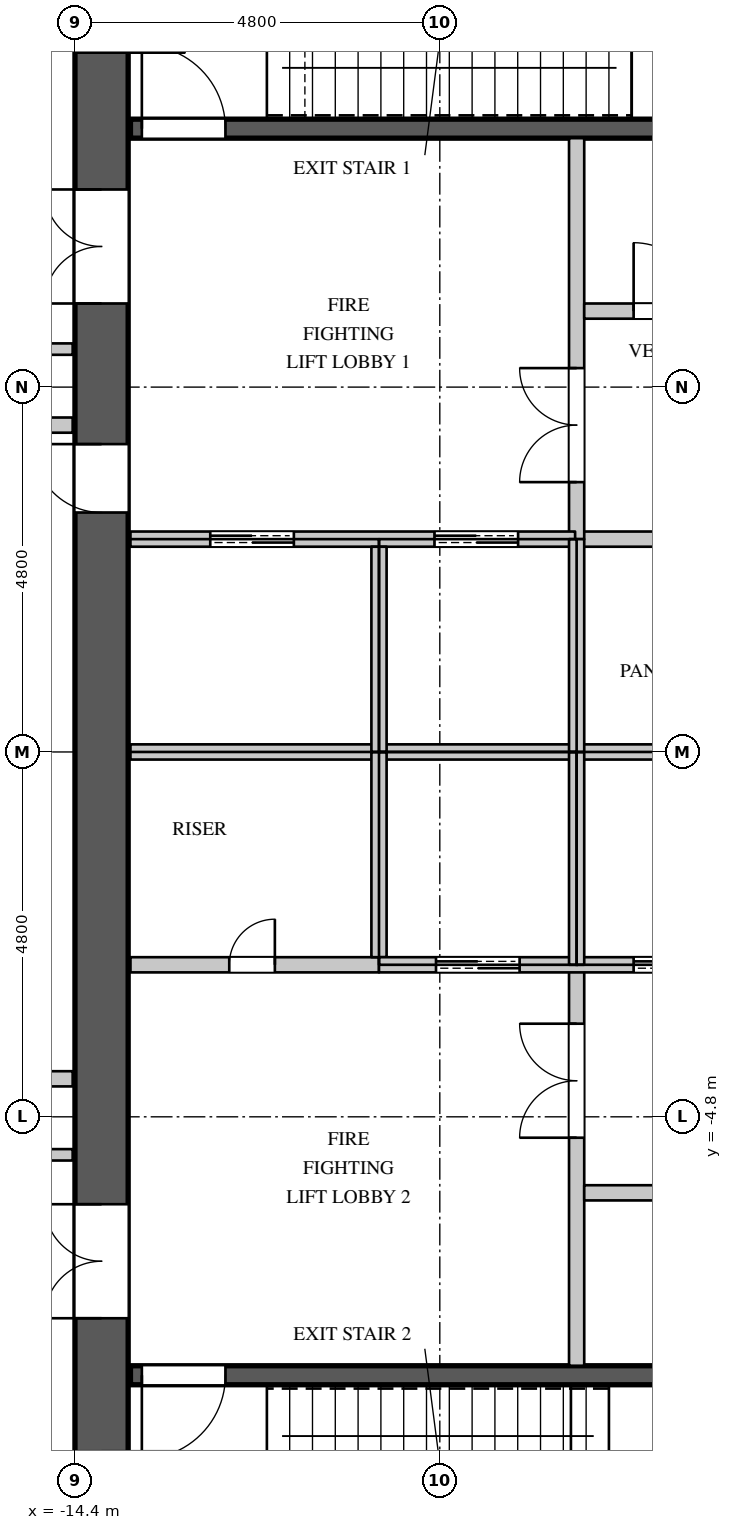
"""IFC4 building model, lengths in metres.
Left out: names, types, materials, properties, quantities, classifications, styles, units other than length and angle.
Written with IfcOpenShell. Run it as: python <this file> out.ifc"""

import sys

from ifc_helpers import new_model, si_unit, direction, frame, frame_2d, origin, place, context, subcontext, project, spatial, rectangle, extrude, element, fill, save


model = new_model("IFC4")
c1 = context("Model", 3, precision=1e-05, world=origin(), true_north=direction((0.0, 1.0)))
c2 = subcontext(c1, "Body", "Model", "MODEL_VIEW")
j1 = project(units=[si_unit("LENGTHUNIT", "METRE"), si_unit("PLANEANGLEUNIT", "RADIAN")], contexts=[c1])
p1 = place(None, origin())
s1 = spatial("IfcSite", under=j1, at=p1, CompositionType="ELEMENT")
p2 = place(p1, origin())
s2 = spatial("IfcBuilding", under=s1, at=p2, CompositionType="ELEMENT")
p3 = place(p2, frame((0.0, 0.0, 208.5)))
s3 = spatial("IfcBuildingStorey", under=s2, at=p3, CompositionType="ELEMENT", Elevation=208.5)
p4 = place(p3, frame((-14.05, -11.3, 0.0), z_axis=(0.0, 0.0, 1.0), x_axis=(0.0, 1.0, 0.0)))
e1 = element("IfcWall", 1, at=p4, inside=s3, PredefinedType="SHEAR", context=c2, shape_type="SweptSolid", body=[
    extrude(rectangle(XDim=22.6, YDim=0.7, at=frame_2d((11.3, 0.0))), origin(), (0.0, 0.0, 1.0), 5.4),
])
p5 = place(p4, frame((17.2, 0.0, 0.0)))
e2 = element("IfcOpeningElement", 2, at=p5, cuts=e1, PredefinedType="OPENING", context=c2, shape_type="SweptSolid", body=[
    extrude(rectangle(XDim=1.5, YDim=2.4, at=frame_2d((0.75, 1.2))), frame((0.0, 0.36, 0.0), z_axis=(0.0, -1.0, 0.0), x_axis=(1.0, 0.0, 0.0)), (0.0, 0.0, 1.0), 0.72),
])
p6 = place(p4, frame((20.5, 0.0, 0.0)))
e3 = element("IfcOpeningElement", 3, at=p6, cuts=e1, PredefinedType="OPENING", context=c2, shape_type="SweptSolid", body=[
    extrude(rectangle(XDim=1.1, YDim=2.2, at=frame_2d((0.55, 1.1))), frame((0.0, 0.36, 0.0), z_axis=(0.0, -1.0, 0.0), x_axis=(1.0, 0.0, 0.0)), (0.0, 0.0, 1.0), 0.72),
])
p7 = place(p4, frame((14.45, 0.0, 0.0)))
e4 = element("IfcOpeningElement", 4, at=p7, cuts=e1, PredefinedType="OPENING", context=c2, shape_type="SweptSolid", body=[
    extrude(rectangle(XDim=0.9, YDim=2.2, at=frame_2d((0.45, 1.1))), frame((0.0, 0.36, 0.0), z_axis=(0.0, -1.0, 0.0), x_axis=(1.0, 0.0, 0.0)), (0.0, 0.0, 1.0), 0.72),
])
p8 = place(p4, frame((3.85, 0.0, 0.0)))
e5 = element("IfcOpeningElement", 5, at=p8, cuts=e1, PredefinedType="OPENING", context=c2, shape_type="SweptSolid", body=[
    extrude(rectangle(XDim=1.5, YDim=2.4, at=frame_2d((0.75, 1.2))), frame((0.0, 0.36, 0.0), z_axis=(0.0, -1.0, 0.0), x_axis=(1.0, 0.0, 0.0)), (0.0, 0.0, 1.0), 0.72),
])
p9 = place(p4, frame((1.0, 0.0, 0.0)))
e6 = element("IfcOpeningElement", 6, at=p9, cuts=e1, PredefinedType="OPENING", context=c2, shape_type="SweptSolid", body=[
    extrude(rectangle(XDim=1.1, YDim=2.2, at=frame_2d((0.55, 1.1))), frame((0.0, 0.36, 0.0), z_axis=(0.0, -1.0, 0.0), x_axis=(1.0, 0.0, 0.0)), (0.0, 0.0, 1.0), 0.72),
])
p10 = place(p3, frame((-7.82, 2.8, 0.0), z_axis=(0.0, 0.0, 1.0), x_axis=(1.0, 0.0, 0.0)))
e7 = element("IfcWall", 7, at=p10, inside=s3, PredefinedType="PARTITIONING", context=c2, shape_type="SweptSolid", body=[
    extrude(rectangle(XDim=18.24, YDim=0.2, at=frame_2d((9.12, 0.0))), origin(), (0.0, 0.0, 1.0), 5.15),
])
p11 = place(p10, frame((2.0, 0.0, 0.0)))
e8 = element("IfcOpeningElement", 8, at=p11, cuts=e7, PredefinedType="OPENING", context=c2, shape_type="SweptSolid", body=[
    extrude(rectangle(XDim=0.9, YDim=2.2, at=frame_2d((0.45, 1.1))), frame((0.0, 0.11, 0.0), z_axis=(0.0, -1.0, 0.0), x_axis=(1.0, 0.0, 0.0)), (0.0, 0.0, 1.0), 0.22),
])
p12 = place(p10, frame((7.0, 0.0, 0.0)))
e9 = element("IfcOpeningElement", 9, at=p12, cuts=e7, PredefinedType="OPENING", context=c2, shape_type="SweptSolid", body=[
    extrude(rectangle(XDim=0.9, YDim=2.2, at=frame_2d((0.45, 1.1))), frame((0.0, 0.11, 0.0), z_axis=(0.0, -1.0, 0.0), x_axis=(1.0, 0.0, 0.0)), (0.0, 0.0, 1.0), 0.22),
])
p13 = place(p10, frame((13.6, 0.0, 0.0)))
e10 = element("IfcOpeningElement", 10, at=p13, cuts=e7, PredefinedType="OPENING", context=c2, shape_type="SweptSolid", body=[
    extrude(rectangle(XDim=0.9, YDim=2.2, at=frame_2d((0.45, 1.1))), frame((0.0, 0.11, 0.0), z_axis=(0.0, -1.0, 0.0), x_axis=(1.0, 0.0, 0.0)), (0.0, 0.0, 1.0), 0.22),
])
p14 = place(p3, frame((-7.8, -8.075, 0.0), z_axis=(0.0, 0.0, 1.0), x_axis=(0.0, 1.0, 0.0)))
e11 = element("IfcWall", 11, at=p14, inside=s3, PredefinedType="PARTITIONING", context=c2, shape_type="SweptSolid", body=[
    extrude(rectangle(XDim=5.275, YDim=0.2, at=frame_2d((2.637, 0.0))), origin(), (0.0, 0.0, 1.0), 5.15),
])
p15 = place(p14, frame((3.0, 0.0, 0.0)))
e12 = element("IfcOpeningElement", 12, at=p15, cuts=e11, PredefinedType="OPENING", context=c2, shape_type="SweptSolid", body=[
    extrude(rectangle(XDim=1.5, YDim=2.4, at=frame_2d((0.75, 1.2))), frame((0.0, 0.11, 0.0), z_axis=(0.0, -1.0, 0.0), x_axis=(1.0, 0.0, 0.0)), (0.0, 0.0, 1.0), 0.22),
])
p16 = place(p3, frame((-7.7, -5.8, 0.0), z_axis=(0.0, 0.0, 1.0), x_axis=(1.0, 0.0, 0.0)))
e13 = element("IfcWall", 13, at=p16, inside=s3, PredefinedType="PARTITIONING", context=c2, shape_type="SweptSolid", body=[
    extrude(rectangle(XDim=21.37, YDim=0.2, at=frame_2d((10.685, 0.0))), origin(), (0.0, 0.0, 1.0), 5.15),
])
p17 = place(p16, frame((1.35, 0.0, 0.0)))
e14 = element("IfcOpeningElement", 14, at=p17, cuts=e13, PredefinedType="OPENING", context=c2, shape_type="SweptSolid", body=[
    extrude(rectangle(XDim=0.9, YDim=2.2, at=frame_2d((0.45, 1.1))), frame((0.0, 0.11, 0.0), z_axis=(0.0, -1.0, 0.0), x_axis=(1.0, 0.0, 0.0)), (0.0, 0.0, 1.0), 0.22),
])
p18 = place(p16, frame((5.85, 0.0, 0.0)))
e15 = element("IfcOpeningElement", 15, at=p18, cuts=e13, PredefinedType="OPENING", context=c2, shape_type="SweptSolid", body=[
    extrude(rectangle(XDim=0.9, YDim=2.2, at=frame_2d((0.45, 1.1))), frame((0.0, 0.11, 0.0), z_axis=(0.0, -1.0, 0.0), x_axis=(1.0, 0.0, 0.0)), (0.0, 0.0, 1.0), 0.22),
])
p19 = place(p16, frame((12.3, 0.0, 0.0)))
e16 = element("IfcOpeningElement", 16, at=p19, cuts=e13, PredefinedType="OPENING", context=c2, shape_type="SweptSolid", body=[
    extrude(rectangle(XDim=0.9, YDim=2.2, at=frame_2d((0.45, 1.1))), frame((0.0, 0.11, 0.0), z_axis=(0.0, -1.0, 0.0), x_axis=(1.0, 0.0, 0.0)), (0.0, 0.0, 1.0), 0.22),
])
p20 = place(p16, frame((18.45, 0.0, 0.0)))
e17 = element("IfcOpeningElement", 17, at=p20, cuts=e13, PredefinedType="OPENING", context=c2, shape_type="SweptSolid", body=[
    extrude(rectangle(XDim=0.9, YDim=2.2, at=frame_2d((0.45, 1.1))), frame((0.0, 0.11, 0.0), z_axis=(0.0, -1.0, 0.0), x_axis=(1.0, 0.0, 0.0)), (0.0, 0.0, 1.0), 0.22),
])
p21 = place(p3, frame((-7.8, 2.8, 0.0), z_axis=(0.0, 0.0, 1.0), x_axis=(0.0, 1.0, 0.0)))
e18 = element("IfcWall", 18, at=p21, inside=s3, PredefinedType="PARTITIONING", context=c2, shape_type="SweptSolid", body=[
    extrude(rectangle(XDim=5.275, YDim=0.2, at=frame_2d((2.637, 0.0))), origin(), (0.0, 0.0, 1.0), 5.15),
])
p22 = place(p21, frame((0.75, 0.0, 0.0)))
e19 = element("IfcOpeningElement", 19, at=p22, cuts=e18, PredefinedType="OPENING", context=c2, shape_type="SweptSolid", body=[
    extrude(rectangle(XDim=1.5, YDim=2.4, at=frame_2d((0.75, 1.2))), frame((0.0, 0.11, 0.0), z_axis=(0.0, -1.0, 0.0), x_axis=(1.0, 0.0, 0.0)), (0.0, 0.0, 1.0), 0.22),
])
p23 = place(p3, frame((-7.7, 5.8, 0.0), z_axis=(0.0, 0.0, 1.0), x_axis=(1.0, 0.0, 0.0)))
e20 = element("IfcWall", 20, at=p23, inside=s3, PredefinedType="PARTITIONING", context=c2, shape_type="SweptSolid", body=[
    extrude(rectangle(XDim=2.28, YDim=0.2, at=frame_2d((1.14, 0.0))), origin(), (0.0, 0.0, 1.0), 5.15),
])
p24 = place(p23, frame((0.65, 0.0, 0.0)))
e21 = element("IfcOpeningElement", 21, at=p24, cuts=e20, PredefinedType="OPENING", context=c2, shape_type="SweptSolid", body=[
    extrude(rectangle(XDim=0.9, YDim=2.2, at=frame_2d((0.45, 1.1))), frame((0.0, 0.11, 0.0), z_axis=(0.0, -1.0, 0.0), x_axis=(1.0, 0.0, 0.0)), (0.0, 0.0, 1.0), 0.22),
])
for number, where, z_axis, x_axis in (
    (22, (-24.055, -5.3, 0.0), (0.0, 0.0, 1.0), (1.0, 0.0, 0.0)),
    (23, (-24.055, 5.3, 0.0), (0.0, 0.0, 1.0), (1.0, 0.0, 0.0)),
):
    element("IfcWall", number, at=place(p3, frame(where, z_axis=z_axis, x_axis=x_axis)), inside=s3, PredefinedType="PARTITIONING", context=c2, shape_type="SweptSolid", body=[
        extrude(rectangle(XDim=9.625, YDim=0.15, at=frame_2d((4.812, 0.0))), origin(), (0.0, 0.0, 1.0), 5.15),
    ])
for number, where, z_axis, x_axis in (
    (24, (-19.872, -4.3, 0.0), (0.0, 0.0, 1.0), (1.0, 0.0, 0.0)),
    (25, (-19.872, 4.3, 0.0), (0.0, 0.0, 1.0), (1.0, 0.0, 0.0)),
):
    element("IfcWall", number, at=place(p3, frame(where, z_axis=z_axis, x_axis=x_axis)), inside=s3, PredefinedType="PARTITIONING", context=c2, shape_type="SweptSolid", body=[
        extrude(rectangle(XDim=5.442, YDim=0.2, at=frame_2d((2.721, 0.0))), origin(), (0.0, 0.0, 1.0), 5.15),
    ])
p25 = place(p3, frame((-13.67, -2.8, 0.0), z_axis=(0.0, 0.0, 1.0), x_axis=(1.0, 0.0, 0.0)))
e26 = element("IfcWall", 26, at=p25, inside=s3, PredefinedType="PARTITIONING", context=c2, shape_type="SweptSolid", body=[
    extrude(rectangle(XDim=3.27, YDim=0.2, at=frame_2d((1.635, 0.0))), origin(), (0.0, 0.0, 1.0), 5.15),
])
p26 = place(p25, frame((1.3, 0.0, 0.0)))
e27 = element("IfcOpeningElement", 27, at=p26, cuts=e26, PredefinedType="OPENING", context=c2, shape_type="SweptSolid", body=[
    extrude(rectangle(XDim=0.6, YDim=2.0, at=frame_2d((0.3, 1.0))), frame((0.0, 0.11, 0.0), z_axis=(0.0, -1.0, 0.0), x_axis=(1.0, 0.0, 0.0)), (0.0, 0.0, 1.0), 0.22),
])
p27 = place(p3, frame((-13.67, 0.0, 0.0), z_axis=(0.0, 0.0, 1.0), x_axis=(1.0, 0.0, 0.0)))
e28 = element("IfcWall", 28, at=p27, inside=s3, PredefinedType="PARTITIONING", context=c2, shape_type="SweptSolid", body=[
    extrude(rectangle(XDim=21.47, YDim=0.2, at=frame_2d((10.735, 0.0))), origin(), (0.0, 0.0, 1.0), 5.15),
])
p28 = place(p3, frame((-13.67, 2.8, 0.0), z_axis=(0.0, 0.0, 1.0), x_axis=(1.0, 0.0, 0.0)))
e29 = element("IfcWall", 29, at=p28, inside=s3, PredefinedType="PARTITIONING", context=c2, shape_type="SweptSolid", body=[
    extrude(rectangle(XDim=5.85, YDim=0.2, at=frame_2d((2.925, 0.0))), origin(), (0.0, 0.0, 1.0), 5.15),
])
p29 = place(p28, frame((1.05, 0.0, 0.0)))
e30 = element("IfcOpeningElement", 30, at=p29, cuts=e29, PredefinedType="OPENING", context=c2, shape_type="SweptSolid", body=[
    extrude(rectangle(XDim=1.1, YDim=2.2, at=frame_2d((0.55, 1.1))), frame((0.0, 0.11, 0.0), z_axis=(0.0, -1.0, 0.0), x_axis=(1.0, 0.0, 0.0)), (0.0, 0.0, 1.0), 0.22),
])
p30 = place(p28, frame((4.0, 0.0, 0.0)))
e31 = element("IfcOpeningElement", 31, at=p30, cuts=e29, PredefinedType="OPENING", context=c2, shape_type="SweptSolid", body=[
    extrude(rectangle(XDim=1.1, YDim=2.2, at=frame_2d((0.55, 1.1))), frame((0.0, 0.11, 0.0), z_axis=(0.0, -1.0, 0.0), x_axis=(1.0, 0.0, 0.0)), (0.0, 0.0, 1.0), 0.22),
])
p31 = place(p3, frame((-10.4, -2.7, 0.0), z_axis=(0.0, 0.0, 1.0), x_axis=(0.0, 1.0, 0.0)))
e32 = element("IfcWall", 32, at=p31, inside=s3, PredefinedType="PARTITIONING", context=c2, shape_type="SweptSolid", body=[
    extrude(rectangle(XDim=2.7, YDim=0.2, at=frame_2d((1.35, 0.0))), origin(), (0.0, 0.0, 1.0), 5.15),
])
p32 = place(p3, frame((-10.4, -2.8, 0.0), z_axis=(0.0, 0.0, 1.0), x_axis=(1.0, 0.0, 0.0)))
e33 = element("IfcWall", 33, at=p32, inside=s3, PredefinedType="PARTITIONING", context=c2, shape_type="SweptSolid", body=[
    extrude(rectangle(XDim=18.2, YDim=0.2, at=frame_2d((9.1, 0.0))), origin(), (0.0, 0.0, 1.0), 5.15),
])
p33 = place(p32, frame((0.75, 0.0, 0.0)))
e34 = element("IfcOpeningElement", 34, at=p33, cuts=e33, PredefinedType="OPENING", context=c2, shape_type="SweptSolid", body=[
    extrude(rectangle(XDim=1.1, YDim=2.2, at=frame_2d((0.55, 1.1))), frame((0.0, 0.11, 0.0), z_axis=(0.0, -1.0, 0.0), x_axis=(1.0, 0.0, 0.0)), (0.0, 0.0, 1.0), 0.22),
])
p34 = place(p32, frame((3.35, 0.0, 0.0)))
e35 = element("IfcOpeningElement", 35, at=p34, cuts=e33, PredefinedType="OPENING", context=c2, shape_type="SweptSolid", body=[
    extrude(rectangle(XDim=1.1, YDim=2.2, at=frame_2d((0.55, 1.1))), frame((0.0, 0.11, 0.0), z_axis=(0.0, -1.0, 0.0), x_axis=(1.0, 0.0, 0.0)), (0.0, 0.0, 1.0), 0.22),
])
p35 = place(p32, frame((5.95, 0.0, 0.0)))
e36 = element("IfcOpeningElement", 36, at=p35, cuts=e33, PredefinedType="OPENING", context=c2, shape_type="SweptSolid", body=[
    extrude(rectangle(XDim=1.1, YDim=2.2, at=frame_2d((0.55, 1.1))), frame((0.0, 0.11, 0.0), z_axis=(0.0, -1.0, 0.0), x_axis=(1.0, 0.0, 0.0)), (0.0, 0.0, 1.0), 0.22),
])
p36 = place(p32, frame((8.55, 0.0, 0.0)))
e37 = element("IfcOpeningElement", 37, at=p36, cuts=e33, PredefinedType="OPENING", context=c2, shape_type="SweptSolid", body=[
    extrude(rectangle(XDim=1.1, YDim=2.2, at=frame_2d((0.55, 1.1))), frame((0.0, 0.11, 0.0), z_axis=(0.0, -1.0, 0.0), x_axis=(1.0, 0.0, 0.0)), (0.0, 0.0, 1.0), 0.22),
])
p37 = place(p32, frame((11.15, 0.0, 0.0)))
e38 = element("IfcOpeningElement", 38, at=p37, cuts=e33, PredefinedType="OPENING", context=c2, shape_type="SweptSolid", body=[
    extrude(rectangle(XDim=1.1, YDim=2.2, at=frame_2d((0.55, 1.1))), frame((0.0, 0.11, 0.0), z_axis=(0.0, -1.0, 0.0), x_axis=(1.0, 0.0, 0.0)), (0.0, 0.0, 1.0), 0.22),
])
p38 = place(p32, frame((13.75, 0.0, 0.0)))
e39 = element("IfcOpeningElement", 39, at=p38, cuts=e33, PredefinedType="OPENING", context=c2, shape_type="SweptSolid", body=[
    extrude(rectangle(XDim=1.1, YDim=2.2, at=frame_2d((0.55, 1.1))), frame((0.0, 0.11, 0.0), z_axis=(0.0, -1.0, 0.0), x_axis=(1.0, 0.0, 0.0)), (0.0, 0.0, 1.0), 0.22),
])
p39 = place(p32, frame((16.35, 0.0, 0.0)))
e40 = element("IfcOpeningElement", 40, at=p39, cuts=e33, PredefinedType="OPENING", context=c2, shape_type="SweptSolid", body=[
    extrude(rectangle(XDim=1.1, YDim=2.2, at=frame_2d((0.55, 1.1))), frame((0.0, 0.11, 0.0), z_axis=(0.0, -1.0, 0.0), x_axis=(1.0, 0.0, 0.0)), (0.0, 0.0, 1.0), 0.22),
])
p40 = place(p3, frame((-10.4, 0.0, 0.0), z_axis=(0.0, 0.0, 1.0), x_axis=(0.0, 1.0, 0.0)))
e41 = element("IfcWall", 41, at=p40, inside=s3, PredefinedType="PARTITIONING", context=c2, shape_type="SweptSolid", body=[
    extrude(rectangle(XDim=2.7, YDim=0.2, at=frame_2d((1.35, 0.0))), origin(), (0.0, 0.0, 1.0), 5.15),
])
for number, where, z_axis, x_axis in (
    (42, (-7.8, -2.8, 0.0), (0.0, 0.0, 1.0), (0.0, 1.0, 0.0)),
    (43, (-7.8, 0.0, 0.0), (0.0, 0.0, 1.0), (0.0, 1.0, 0.0)),
):
    element("IfcWall", number, at=place(p3, frame(where, z_axis=z_axis, x_axis=x_axis)), inside=s3, PredefinedType="PARTITIONING", context=c2, shape_type="SweptSolid", body=[
        extrude(rectangle(XDim=2.8, YDim=0.2, at=frame_2d((1.4, 0.0))), origin(), (0.0, 0.0, 1.0), 5.15),
    ])
p41 = place(p3, frame((-13.67, -8.2, 0.0), z_axis=(0.0, 0.0, 1.0), x_axis=(1.0, 0.0, 0.0)))
e44 = element("IfcWall", 44, at=p41, inside=s3, PredefinedType="SHEAR", context=c2, shape_type="SweptSolid", body=[
    extrude(rectangle(XDim=8.395, YDim=0.25, at=frame_2d((4.198, 0.0))), origin(), (0.0, 0.0, 1.0), 5.15),
])
p42 = place(p41, frame((0.15, 0.0, 0.0)))
e45 = element("IfcOpeningElement", 45, at=p42, cuts=e44, PredefinedType="OPENING", context=c2, shape_type="SweptSolid", body=[
    extrude(rectangle(XDim=1.1, YDim=2.2, at=frame_2d((0.55, 1.1))), frame((0.0, 0.135, 0.0), z_axis=(0.0, -1.0, 0.0), x_axis=(1.0, 0.0, 0.0)), (0.0, 0.0, 1.0), 0.27),
])
p43 = place(p3, frame((-13.67, 8.2, 0.0), z_axis=(0.0, 0.0, 1.0), x_axis=(1.0, 0.0, 0.0)))
e46 = element("IfcWall", 46, at=p43, inside=s3, PredefinedType="SHEAR", context=c2, shape_type="SweptSolid", body=[
    extrude(rectangle(XDim=8.145, YDim=0.25, at=frame_2d((4.073, 0.0))), origin(), (0.0, 0.0, 1.0), 5.15),
])
p44 = place(p43, frame((0.15, 0.0, 0.0)))
e47 = element("IfcOpeningElement", 47, at=p44, cuts=e46, PredefinedType="OPENING", context=c2, shape_type="SweptSolid", body=[
    extrude(rectangle(XDim=1.1, YDim=2.2, at=frame_2d((0.55, 1.1))), frame((0.0, 0.135, 0.0), z_axis=(0.0, -1.0, 0.0), x_axis=(1.0, 0.0, 0.0)), (0.0, 0.0, 1.0), 0.27),
])
p45 = place(p26, origin())
e48 = element("IfcDoor", 48, at=p45, inside=s3, OperationType="SINGLE_SWING_RIGHT", PredefinedType="DOOR", context=c2, shape_type="SweptSolid", body=[
    extrude(rectangle(XDim=0.6, YDim=2.0, at=frame_2d((0.3, 1.0))), frame((0.0, 0.025, 0.0), z_axis=(0.0, -1.0, 0.0), x_axis=(1.0, 0.0, 0.0)), (0.0, 0.0, 1.0), 0.05),
])
fill(e27, e48)
p46 = place(p24, origin())
e49 = element("IfcDoor", 49, at=p46, inside=s3, OperationType="SINGLE_SWING_LEFT", PredefinedType="DOOR", context=c2, shape_type="SweptSolid", body=[
    extrude(rectangle(XDim=0.9, YDim=2.2, at=frame_2d((0.45, 1.1))), frame((0.0, 0.025, 0.0), z_axis=(0.0, -1.0, 0.0), x_axis=(1.0, 0.0, 0.0)), (0.0, 0.0, 1.0), 0.05),
])
fill(e21, e49)
p47 = place(p29, origin())
e50 = element("IfcDoor", 50, at=p47, inside=s3, OperationType="DOUBLE_DOOR_SLIDING", PredefinedType="DOOR", context=c2, shape_type="SweptSolid", body=[
    extrude(rectangle(XDim=1.1, YDim=2.2, at=frame_2d((0.55, 1.1))), frame((0.0, 0.025, 0.0), z_axis=(0.0, -1.0, 0.0), x_axis=(1.0, 0.0, 0.0)), (0.0, 0.0, 1.0), 0.05),
])
fill(e30, e50)
p48 = place(p30, origin())
e51 = element("IfcDoor", 51, at=p48, inside=s3, OperationType="DOUBLE_DOOR_SLIDING", PredefinedType="DOOR", context=c2, shape_type="SweptSolid", body=[
    extrude(rectangle(XDim=1.1, YDim=2.2, at=frame_2d((0.55, 1.1))), frame((0.0, 0.025, 0.0), z_axis=(0.0, -1.0, 0.0), x_axis=(1.0, 0.0, 0.0)), (0.0, 0.0, 1.0), 0.05),
])
fill(e31, e51)
p49 = place(p33, origin())
e52 = element("IfcDoor", 52, at=p49, inside=s3, OperationType="DOUBLE_DOOR_SLIDING", PredefinedType="DOOR", context=c2, shape_type="SweptSolid", body=[
    extrude(rectangle(XDim=1.1, YDim=2.2, at=frame_2d((0.55, 1.1))), frame((0.0, 0.025, 0.0), z_axis=(0.0, -1.0, 0.0), x_axis=(1.0, 0.0, 0.0)), (0.0, 0.0, 1.0), 0.05),
])
fill(e34, e52)
p50 = place(p34, origin())
e53 = element("IfcDoor", 53, at=p50, inside=s3, OperationType="DOUBLE_DOOR_SLIDING", PredefinedType="DOOR", context=c2, shape_type="SweptSolid", body=[
    extrude(rectangle(XDim=1.1, YDim=2.2, at=frame_2d((0.55, 1.1))), frame((0.0, 0.025, 0.0), z_axis=(0.0, -1.0, 0.0), x_axis=(1.0, 0.0, 0.0)), (0.0, 0.0, 1.0), 0.05),
])
fill(e35, e53)
p51 = place(p44, origin())
e54 = element("IfcDoor", 54, at=p51, inside=s3, OperationType="SINGLE_SWING_LEFT", PredefinedType="DOOR", context=c2, shape_type="SweptSolid", body=[
    extrude(rectangle(XDim=1.1, YDim=2.2, at=frame_2d((0.55, 1.1))), frame((0.0, 0.025, 0.0), z_axis=(0.0, -1.0, 0.0), x_axis=(1.0, 0.0, 0.0)), (0.0, 0.0, 1.0), 0.05),
])
fill(e47, e54)
p52 = place(p42, origin())
e55 = element("IfcDoor", 55, at=p52, inside=s3, OperationType="SINGLE_SWING_RIGHT", PredefinedType="DOOR", context=c2, shape_type="SweptSolid", body=[
    extrude(rectangle(XDim=1.1, YDim=2.2, at=frame_2d((0.55, 1.1))), frame((0.0, 0.025, 0.0), z_axis=(0.0, -1.0, 0.0), x_axis=(1.0, 0.0, 0.0)), (0.0, 0.0, 1.0), 0.05),
])
fill(e45, e55)
p53 = place(p22, origin())
e56 = element("IfcDoor", 56, at=p53, inside=s3, OperationType="DOUBLE_DOOR_SINGLE_SWING", PredefinedType="DOOR", context=c2, shape_type="SweptSolid", body=[
    extrude(rectangle(XDim=1.5, YDim=2.4, at=frame_2d((0.75, 1.2))), frame((0.0, 0.025, 0.0), z_axis=(0.0, -1.0, 0.0), x_axis=(1.0, 0.0, 0.0)), (0.0, 0.0, 1.0), 0.05),
])
fill(e19, e56)
p54 = place(p15, origin())
e57 = element("IfcDoor", 57, at=p54, inside=s3, OperationType="DOUBLE_DOOR_SINGLE_SWING", PredefinedType="DOOR", context=c2, shape_type="SweptSolid", body=[
    extrude(rectangle(XDim=1.5, YDim=2.4, at=frame_2d((0.75, 1.2))), frame((0.0, 0.025, 0.0), z_axis=(0.0, -1.0, 0.0), x_axis=(1.0, 0.0, 0.0)), (0.0, 0.0, 1.0), 0.05),
])
fill(e12, e57)
p55 = place(p5, origin())
e58 = element("IfcDoor", 58, at=p55, inside=s3, OperationType="DOUBLE_DOOR_SINGLE_SWING", PredefinedType="DOOR", context=c2, shape_type="SweptSolid", body=[
    extrude(rectangle(XDim=1.5, YDim=2.4, at=frame_2d((0.75, 1.2))), frame((0.0, 0.345, 0.0), z_axis=(0.0, -1.0, 0.0), x_axis=(1.0, 0.0, 0.0)), (0.0, 0.0, 1.0), 0.05),
])
fill(e2, e58)
p56 = place(p7, origin())
e59 = element("IfcDoor", 59, at=p56, inside=s3, OperationType="SINGLE_SWING_RIGHT", PredefinedType="DOOR", context=c2, shape_type="SweptSolid", body=[
    extrude(rectangle(XDim=0.9, YDim=2.2, at=frame_2d((0.45, 1.1))), frame((0.0, 0.345, 0.0), z_axis=(0.0, -1.0, 0.0), x_axis=(1.0, 0.0, 0.0)), (0.0, 0.0, 1.0), 0.05),
])
fill(e4, e59)
p57 = place(p8, origin())
e60 = element("IfcDoor", 60, at=p57, inside=s3, OperationType="DOUBLE_DOOR_SINGLE_SWING", PredefinedType="DOOR", context=c2, shape_type="SweptSolid", body=[
    extrude(rectangle(XDim=1.5, YDim=2.4, at=frame_2d((0.75, 1.2))), frame((0.0, 0.345, 0.0), z_axis=(0.0, -1.0, 0.0), x_axis=(1.0, 0.0, 0.0)), (0.0, 0.0, 1.0), 0.05),
])
fill(e5, e60)
save(model, sys.argv[1])
